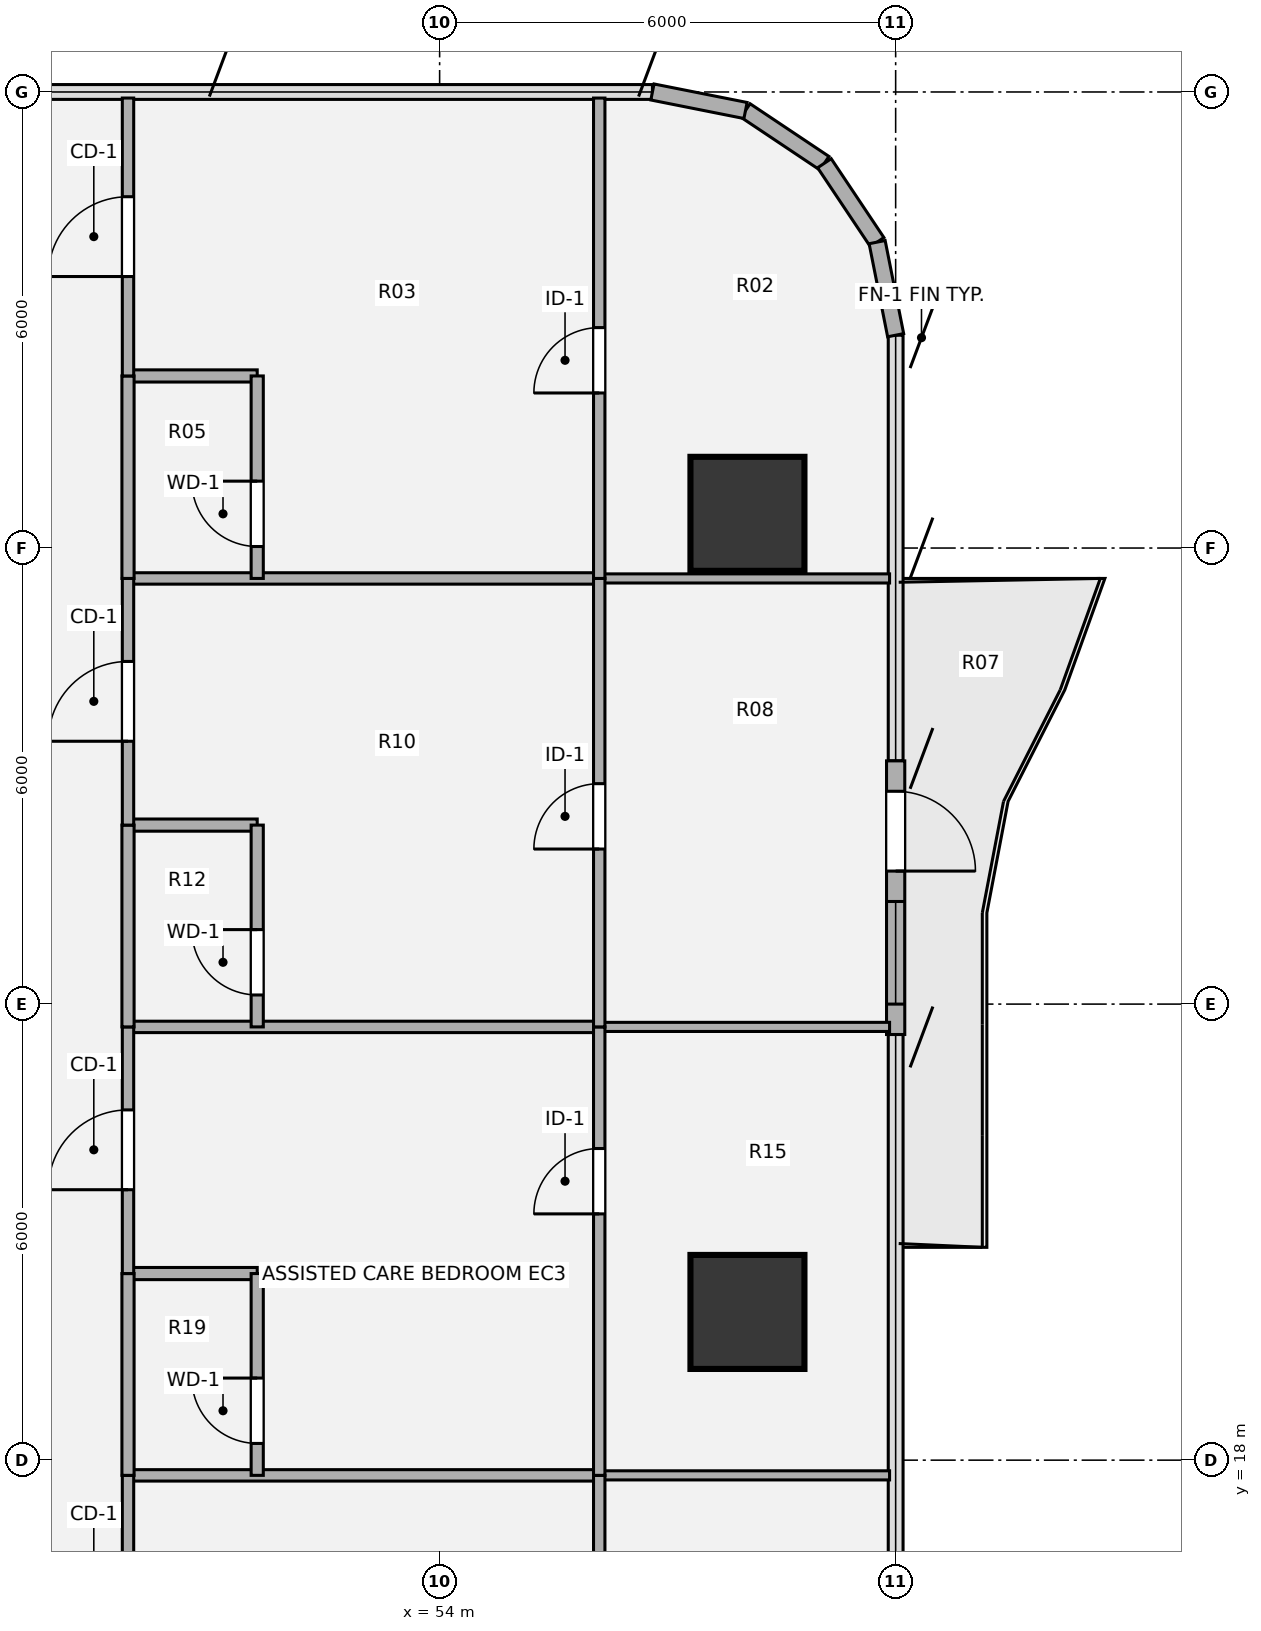
"""IFC4 building model, lengths in metres.
Left out: names, types, materials, properties, quantities, classifications, styles, units other than length and angle.
Written with IfcOpenShell. Run it as: python <this file> out.ifc"""

import sys

from ifc_helpers import new_model, si_unit, direction, frame, frame_2d, origin, origin_2d, place, context, subcontext, project, spatial, rectangle, hollow_circle, extrude, source, transform, mapped, element, fill, save


model = new_model("IFC4")
c1 = context("Model", 3, precision=1e-05, world=origin(), true_north=direction((0.0, 1.0)))
c2 = subcontext(c1, "Body", "Model", "MODEL_VIEW")
j1 = project(units=[si_unit("LENGTHUNIT", "METRE"), si_unit("PLANEANGLEUNIT", "RADIAN")], contexts=[c1])
p1 = place(None, origin())
s1 = spatial("IfcSite", under=j1, at=p1, CompositionType="ELEMENT")
p2 = place(p1, origin())
s2 = spatial("IfcBuilding", under=s1, at=p2, CompositionType="ELEMENT")
p3 = place(p2, frame((0.0, 0.0, 38.34)))
s3 = spatial("IfcBuildingStorey", under=s2, at=p3, CompositionType="ELEMENT", Elevation=38.34)
m1 = source(origin(), c2, "Body", "SweptSolid", [
    extrude(hollow_circle(Radius=0.75, WallThickness=0.05, at=origin_2d()), origin(), (0.0, 0.0, 1.0), 3.78),
])
for number, where, z_axis, x_axis in (
    (1, (58.05, 19.95, 0.0), (0.0, 0.0, 1.0), (1.0, 0.0, 0.0)),
    (2, (58.05, 30.45, 0.0), (0.0, 0.0, 1.0), (1.0, 0.0, 0.0)),
):
    element("IfcColumn", number, at=place(p3, frame(where, z_axis=z_axis, x_axis=x_axis)), inside=s3, PredefinedType="COLUMN", context=c2, shape_type="MappedRepresentation", body=[
        mapped(m1, transform((0.0, 0.0, 0.0), x_axis=(1.0, 0.0, 0.0), y_axis=(0.0, 1.0, 0.0), z_axis=(0.0, 0.0, 1.0), scale=1.0)),
    ])
for number, where, z_axis, x_axis in (
    (3, (58.025, 35.756, 0.0), (0.0, 0.0, 1.0), (0.831, -0.556, 0.0)),
    (4, (59.063, 35.063, 0.0), (0.0, 0.0, 1.0), (0.556, -0.831, 0.0)),
    (5, (59.756, 34.025, 0.0), (0.0, 0.0, 1.0), (0.195, -0.981, 0.0)),
):
    element("IfcWall", number, at=place(p3, frame(where, z_axis=z_axis, x_axis=x_axis)), inside=s3, PredefinedType="SOLIDWALL", context=c2, shape_type="SweptSolid", body=[
        extrude(rectangle(XDim=1.249, YDim=0.215, at=frame_2d((0.624, 0.0))), origin(), (0.0, 0.0, 1.0), 3.53),
    ])
p4 = place(p3, frame((60.0, 27.2, 0.0), z_axis=(0.0, 0.0, 1.0), x_axis=(0.0, -1.0, 0.0)))
e6 = element("IfcWall", 6, at=p4, inside=s3, PredefinedType="SOLIDWALL", context=c2, shape_type="SweptSolid", body=[
    extrude(rectangle(XDim=3.6, YDim=0.24, at=frame_2d((1.8, 0.0))), origin(), (0.0, 0.0, 1.0), 3.53),
])
p5 = place(p4, frame((0.4, 0.0, 0.0)))
e7 = element("IfcOpeningElement", 7, at=p5, cuts=e6, PredefinedType="OPENING", context=c2, shape_type="SweptSolid", body=[
    extrude(rectangle(XDim=1.05, YDim=2.15, at=origin_2d()), frame((0.525, 0.13, 1.075), z_axis=(0.0, -1.0, 0.0), x_axis=(1.0, 0.0, 0.0)), (0.0, 0.0, 1.0), 0.26),
])
p6 = place(p4, frame((1.85, 0.0, 0.85)))
e8 = element("IfcOpeningElement", 8, at=p6, cuts=e6, PredefinedType="OPENING", context=c2, shape_type="SweptSolid", body=[
    extrude(rectangle(XDim=1.35, YDim=1.35, at=origin_2d()), frame((0.675, 0.13, 0.675), z_axis=(0.0, -1.0, 0.0), x_axis=(1.0, 0.0, 0.0)), (0.0, 0.0, 1.0), 0.26),
])
p7 = place(p3, frame((56.8, 36.0, 0.0), z_axis=(0.0, 0.0, 1.0), x_axis=(0.980775717779, -0.195138390419, 0.0)))
e9 = element("IfcWall", 9, at=p7, inside=s3, PredefinedType="SOLIDWALL", context=c2, shape_type="SweptSolid", body=[
    extrude(rectangle(XDim=1.249, YDim=0.215, at=frame_2d((0.624, 0.0))), origin(), (0.0, 0.0, 1.0), 3.53),
])
p8 = place(p3, frame((49.9, 17.8, 0.0), z_axis=(0.0, 0.0, 1.0), x_axis=(1.0, 0.0, 0.0)))
e10 = element("IfcWall", 10, at=p8, inside=s3, PredefinedType="PARTITIONING", context=c2, shape_type="SweptSolid", body=[
    extrude(rectangle(XDim=6.2, YDim=0.15, at=frame_2d((3.1, 0.0))), origin(), (0.0, 0.0, 1.0), 3.5),
])
p9 = place(p3, frame((56.1, 17.8, 0.0), z_axis=(0.0, 0.0, 1.0), x_axis=(1.0, 0.0, 0.0)))
e11 = element("IfcWall", 11, at=p9, inside=s3, PredefinedType="PARTITIONING", context=c2, shape_type="SweptSolid", body=[
    extrude(rectangle(XDim=3.82, YDim=0.12, at=frame_2d((1.91, 0.0))), origin(), (0.0, 0.0, 1.0), 3.5),
])
p10 = place(p3, frame((49.9, 20.455, 0.0), z_axis=(0.0, 0.0, 1.0), x_axis=(1.0, 0.0, 0.0)))
e12 = element("IfcWall", 12, at=p10, inside=s3, PredefinedType="PLUMBINGWALL", context=c2, shape_type="SweptSolid", body=[
    extrude(rectangle(XDim=1.7, YDim=0.16, at=frame_2d((0.85, 0.0))), origin(), (0.0, 0.0, 1.0), 2.982),
])
p11 = place(p3, frame((49.9, 23.7, 0.0), z_axis=(0.0, 0.0, 1.0), x_axis=(1.0, 0.0, 0.0)))
e13 = element("IfcWall", 13, at=p11, inside=s3, PredefinedType="PARTITIONING", context=c2, shape_type="SweptSolid", body=[
    extrude(rectangle(XDim=6.2, YDim=0.15, at=frame_2d((3.1, 0.0))), origin(), (0.0, 0.0, 1.0), 2.982),
])
p12 = place(p3, frame((56.1, 23.7, 0.0), z_axis=(0.0, 0.0, 1.0), x_axis=(1.0, 0.0, 0.0)))
e14 = element("IfcWall", 14, at=p12, inside=s3, PredefinedType="PARTITIONING", context=c2, shape_type="SweptSolid", body=[
    extrude(rectangle(XDim=3.82, YDim=0.12, at=frame_2d((1.91, 0.0))), origin(), (0.0, 0.0, 1.0), 2.982),
])
p13 = place(p3, frame((49.9, 26.355, 0.0), z_axis=(0.0, 0.0, 1.0), x_axis=(1.0, 0.0, 0.0)))
e15 = element("IfcWall", 15, at=p13, inside=s3, PredefinedType="PLUMBINGWALL", context=c2, shape_type="SweptSolid", body=[
    extrude(rectangle(XDim=1.7, YDim=0.16, at=frame_2d((0.85, 0.0))), origin(), (0.0, 0.0, 1.0), 2.982),
])
p14 = place(p3, frame((49.9, 29.6, 0.0), z_axis=(0.0, 0.0, 1.0), x_axis=(1.0, 0.0, 0.0)))
e16 = element("IfcWall", 16, at=p14, inside=s3, PredefinedType="PARTITIONING", context=c2, shape_type="SweptSolid", body=[
    extrude(rectangle(XDim=6.2, YDim=0.15, at=frame_2d((3.1, 0.0))), origin(), (0.0, 0.0, 1.0), 2.982),
])
p15 = place(p3, frame((56.1, 29.6, 0.0), z_axis=(0.0, 0.0, 1.0), x_axis=(1.0, 0.0, 0.0)))
e17 = element("IfcWall", 17, at=p15, inside=s3, PredefinedType="PARTITIONING", context=c2, shape_type="SweptSolid", body=[
    extrude(rectangle(XDim=3.82, YDim=0.12, at=frame_2d((1.91, 0.0))), origin(), (0.0, 0.0, 1.0), 2.982),
])
p16 = place(p3, frame((49.9, 32.264, 0.0), z_axis=(0.0, 0.0, 1.0), x_axis=(1.0, 0.0, 0.0)))
e18 = element("IfcWall", 18, at=p16, inside=s3, PredefinedType="PLUMBINGWALL", context=c2, shape_type="SweptSolid", body=[
    extrude(rectangle(XDim=1.7, YDim=0.16, at=frame_2d((0.85, 0.0))), origin(), (0.0, 0.0, 1.0), 3.5),
])
p17 = place(p3, frame((49.9, 14.555, 0.0), z_axis=(0.0, 0.0, 1.0), x_axis=(0.0, 1.0, 0.0)))
e19 = element("IfcWall", 19, at=p17, inside=s3, PredefinedType="PARTITIONING", context=c2, shape_type="SweptSolid", body=[
    extrude(rectangle(XDim=3.245, YDim=0.15, at=frame_2d((1.623, 0.0))), origin(), (0.0, 0.0, 1.0), 3.5),
])
p18 = place(p17, frame((1.103, 0.0, 0.0)))
e20 = element("IfcOpeningElement", 20, at=p18, cuts=e19, PredefinedType="OPENING", context=c2, shape_type="SweptSolid", body=[
    extrude(rectangle(XDim=1.05, YDim=2.1, at=origin_2d()), frame((0.525, 0.085, 1.05), z_axis=(0.0, -1.0, 0.0), x_axis=(1.0, 0.0, 0.0)), (0.0, 0.0, 1.0), 0.17),
])
p19 = place(p3, frame((49.9, 17.8, 0.0), z_axis=(0.0, 0.0, 1.0), x_axis=(0.0, 1.0, 0.0)))
e21 = element("IfcWall", 21, at=p19, inside=s3, PredefinedType="PLUMBINGWALL", context=c2, shape_type="SweptSolid", body=[
    extrude(rectangle(XDim=2.655, YDim=0.16, at=frame_2d((1.328, 0.0))), origin(), (0.0, 0.0, 1.0), 3.5),
])
p20 = place(p3, frame((49.9, 20.455, 0.0), z_axis=(0.0, 0.0, 1.0), x_axis=(0.0, 1.0, 0.0)))
e22 = element("IfcWall", 22, at=p20, inside=s3, PredefinedType="PARTITIONING", context=c2, shape_type="SweptSolid", body=[
    extrude(rectangle(XDim=3.245, YDim=0.15, at=frame_2d((1.623, 0.0))), origin(), (0.0, 0.0, 1.0), 3.5),
])
p21 = place(p20, frame((1.103, 0.0, 0.0)))
e23 = element("IfcOpeningElement", 23, at=p21, cuts=e22, PredefinedType="OPENING", context=c2, shape_type="SweptSolid", body=[
    extrude(rectangle(XDim=1.05, YDim=2.1, at=origin_2d()), frame((0.525, 0.085, 1.05), z_axis=(0.0, -1.0, 0.0), x_axis=(1.0, 0.0, 0.0)), (0.0, 0.0, 1.0), 0.17),
])
p22 = place(p3, frame((49.9, 23.7, 0.0), z_axis=(0.0, 0.0, 1.0), x_axis=(0.0, 1.0, 0.0)))
e24 = element("IfcWall", 24, at=p22, inside=s3, PredefinedType="PLUMBINGWALL", context=c2, shape_type="SweptSolid", body=[
    extrude(rectangle(XDim=2.655, YDim=0.16, at=frame_2d((1.328, 0.0))), origin(), (0.0, 0.0, 1.0), 3.5),
])
p23 = place(p3, frame((49.9, 26.355, 0.0), z_axis=(0.0, 0.0, 1.0), x_axis=(0.0, 1.0, 0.0)))
e25 = element("IfcWall", 25, at=p23, inside=s3, PredefinedType="PARTITIONING", context=c2, shape_type="SweptSolid", body=[
    extrude(rectangle(XDim=3.245, YDim=0.15, at=frame_2d((1.623, 0.0))), origin(), (0.0, 0.0, 1.0), 3.5),
])
p24 = place(p23, frame((1.103, 0.0, 0.0)))
e26 = element("IfcOpeningElement", 26, at=p24, cuts=e25, PredefinedType="OPENING", context=c2, shape_type="SweptSolid", body=[
    extrude(rectangle(XDim=1.05, YDim=2.1, at=origin_2d()), frame((0.525, 0.085, 1.05), z_axis=(0.0, -1.0, 0.0), x_axis=(1.0, 0.0, 0.0)), (0.0, 0.0, 1.0), 0.17),
])
p25 = place(p3, frame((49.9, 29.6, 0.0), z_axis=(0.0, 0.0, 1.0), x_axis=(0.0, 1.0, 0.0)))
e27 = element("IfcWall", 27, at=p25, inside=s3, PredefinedType="PLUMBINGWALL", context=c2, shape_type="SweptSolid", body=[
    extrude(rectangle(XDim=2.664, YDim=0.16, at=frame_2d((1.332, 0.0))), origin(), (0.0, 0.0, 1.0), 3.5),
])
p26 = place(p3, frame((49.9, 32.264, 0.0), z_axis=(0.0, 0.0, 1.0), x_axis=(0.0, 1.0, 0.0)))
e28 = element("IfcWall", 28, at=p26, inside=s3, PredefinedType="PARTITIONING", context=c2, shape_type="SweptSolid", body=[
    extrude(rectangle(XDim=3.656, YDim=0.15, at=frame_2d((1.828, 0.0))), origin(), (0.0, 0.0, 1.0), 3.5),
])
p27 = place(p26, frame((1.308, 0.0, 0.0)))
e29 = element("IfcOpeningElement", 29, at=p27, cuts=e28, PredefinedType="OPENING", context=c2, shape_type="SweptSolid", body=[
    extrude(rectangle(XDim=1.05, YDim=2.1, at=origin_2d()), frame((0.525, 0.085, 1.05), z_axis=(0.0, -1.0, 0.0), x_axis=(1.0, 0.0, 0.0)), (0.0, 0.0, 1.0), 0.17),
])
p28 = place(p3, frame((51.6, 17.8, 0.0), z_axis=(0.0, 0.0, 1.0), x_axis=(0.0, 1.0, 0.0)))
e30 = element("IfcWall", 30, at=p28, inside=s3, PredefinedType="PLUMBINGWALL", context=c2, shape_type="SweptSolid", body=[
    extrude(rectangle(XDim=2.655, YDim=0.16, at=frame_2d((1.328, 0.0))), origin(), (0.0, 0.0, 1.0), 3.5),
])
p29 = place(p28, frame((0.42, 0.0, 0.0)))
e31 = element("IfcOpeningElement", 31, at=p29, cuts=e30, PredefinedType="OPENING", context=c2, shape_type="SweptSolid", body=[
    extrude(rectangle(XDim=0.86, YDim=2.1, at=origin_2d()), frame((0.43, 0.09, 1.05), z_axis=(0.0, -1.0, 0.0), x_axis=(1.0, 0.0, 0.0)), (0.0, 0.0, 1.0), 0.18),
])
p30 = place(p3, frame((51.6, 23.7, 0.0), z_axis=(0.0, 0.0, 1.0), x_axis=(0.0, 1.0, 0.0)))
e32 = element("IfcWall", 32, at=p30, inside=s3, PredefinedType="PLUMBINGWALL", context=c2, shape_type="SweptSolid", body=[
    extrude(rectangle(XDim=2.655, YDim=0.16, at=frame_2d((1.328, 0.0))), origin(), (0.0, 0.0, 1.0), 3.5),
])
p31 = place(p30, frame((0.42, 0.0, 0.0)))
e33 = element("IfcOpeningElement", 33, at=p31, cuts=e32, PredefinedType="OPENING", context=c2, shape_type="SweptSolid", body=[
    extrude(rectangle(XDim=0.86, YDim=2.1, at=origin_2d()), frame((0.43, 0.09, 1.05), z_axis=(0.0, -1.0, 0.0), x_axis=(1.0, 0.0, 0.0)), (0.0, 0.0, 1.0), 0.18),
])
p32 = place(p3, frame((51.6, 29.6, 0.0), z_axis=(0.0, 0.0, 1.0), x_axis=(0.0, 1.0, 0.0)))
e34 = element("IfcWall", 34, at=p32, inside=s3, PredefinedType="PLUMBINGWALL", context=c2, shape_type="SweptSolid", body=[
    extrude(rectangle(XDim=2.664, YDim=0.16, at=frame_2d((1.332, 0.0))), origin(), (0.0, 0.0, 1.0), 3.5),
])
p33 = place(p32, frame((0.42, 0.0, 0.0)))
e35 = element("IfcOpeningElement", 35, at=p33, cuts=e34, PredefinedType="OPENING", context=c2, shape_type="SweptSolid", body=[
    extrude(rectangle(XDim=0.86, YDim=2.1, at=origin_2d()), frame((0.43, 0.09, 1.05), z_axis=(0.0, -1.0, 0.0), x_axis=(1.0, 0.0, 0.0)), (0.0, 0.0, 1.0), 0.18),
])
p34 = place(p3, frame((56.1, 11.9, 0.0), z_axis=(0.0, 0.0, 1.0), x_axis=(0.0, 1.0, 0.0)))
e36 = element("IfcWall", 36, at=p34, inside=s3, PredefinedType="PARTITIONING", context=c2, shape_type="SweptSolid", body=[
    extrude(rectangle(XDim=5.9, YDim=0.15, at=frame_2d((2.95, 0.0))), origin(), (0.0, 0.0, 1.0), 3.5),
])
p35 = place(p34, frame((2.14, 0.0, 0.0)))
e37 = element("IfcOpeningElement", 37, at=p35, cuts=e36, PredefinedType="OPENING", context=c2, shape_type="SweptSolid", body=[
    extrude(rectangle(XDim=0.86, YDim=2.1, at=origin_2d()), frame((0.43, 0.085, 1.05), z_axis=(0.0, -1.0, 0.0), x_axis=(1.0, 0.0, 0.0)), (0.0, 0.0, 1.0), 0.17),
])
p36 = place(p3, frame((56.1, 17.8, 0.0), z_axis=(0.0, 0.0, 1.0), x_axis=(0.0, 1.0, 0.0)))
e38 = element("IfcWall", 38, at=p36, inside=s3, PredefinedType="PARTITIONING", context=c2, shape_type="SweptSolid", body=[
    extrude(rectangle(XDim=5.9, YDim=0.15, at=frame_2d((2.95, 0.0))), origin(), (0.0, 0.0, 1.0), 3.5),
])
p37 = place(p36, frame((3.44, 0.0, 0.0)))
e39 = element("IfcOpeningElement", 39, at=p37, cuts=e38, PredefinedType="OPENING", context=c2, shape_type="SweptSolid", body=[
    extrude(rectangle(XDim=0.86, YDim=2.1, at=origin_2d()), frame((0.43, 0.085, 1.05), z_axis=(0.0, -1.0, 0.0), x_axis=(1.0, 0.0, 0.0)), (0.0, 0.0, 1.0), 0.17),
])
p38 = place(p3, frame((56.1, 23.7, 0.0), z_axis=(0.0, 0.0, 1.0), x_axis=(0.0, 1.0, 0.0)))
e40 = element("IfcWall", 40, at=p38, inside=s3, PredefinedType="PARTITIONING", context=c2, shape_type="SweptSolid", body=[
    extrude(rectangle(XDim=5.9, YDim=0.15, at=frame_2d((2.95, 0.0))), origin(), (0.0, 0.0, 1.0), 3.5),
])
p39 = place(p38, frame((2.34, 0.0, 0.0)))
e41 = element("IfcOpeningElement", 41, at=p39, cuts=e40, PredefinedType="OPENING", context=c2, shape_type="SweptSolid", body=[
    extrude(rectangle(XDim=0.86, YDim=2.1, at=origin_2d()), frame((0.43, 0.085, 1.05), z_axis=(0.0, -1.0, 0.0), x_axis=(1.0, 0.0, 0.0)), (0.0, 0.0, 1.0), 0.17),
])
p40 = place(p3, frame((56.1, 29.6, 0.0), z_axis=(0.0, 0.0, 1.0), x_axis=(0.0, 1.0, 0.0)))
e42 = element("IfcWall", 42, at=p40, inside=s3, PredefinedType="PARTITIONING", context=c2, shape_type="SweptSolid", body=[
    extrude(rectangle(XDim=6.32, YDim=0.15, at=frame_2d((3.16, 0.0))), origin(), (0.0, 0.0, 1.0), 3.5),
])
p41 = place(p40, frame((2.44, 0.0, 0.0)))
e43 = element("IfcOpeningElement", 43, at=p41, cuts=e42, PredefinedType="OPENING", context=c2, shape_type="SweptSolid", body=[
    extrude(rectangle(XDim=0.86, YDim=2.1, at=origin_2d()), frame((0.43, 0.085, 1.05), z_axis=(0.0, -1.0, 0.0), x_axis=(1.0, 0.0, 0.0)), (0.0, 0.0, 1.0), 0.17),
])
m2 = source(origin(), c2, "Body", "SweptSolid", [
    extrude(rectangle(XDim=1.05, YDim=2.15, at=origin_2d()), frame((0.525, 0.025, 1.075), z_axis=(0.0, -1.0, 0.0), x_axis=(1.0, 0.0, 0.0)), (0.0, 0.0, 1.0), 0.05),
])
p42 = place(p5, origin())
e44 = element("IfcDoor", 44, at=p42, inside=s3, OperationType="SINGLE_SWING_RIGHT", PredefinedType="DOOR", context=c2, shape_type="MappedRepresentation", body=[
    mapped(m2, transform((0.0, 0.0, 0.0), x_axis=(1.0, 0.0, 0.0), y_axis=(0.0, 1.0, 0.0), z_axis=(0.0, 0.0, 1.0), scale=1.0)),
])
fill(e7, e44)
m3 = source(origin(), c2, "Body", "SweptSolid", [
    extrude(rectangle(XDim=1.35, YDim=1.35, at=origin_2d()), frame((0.675, 0.03, 0.675), z_axis=(0.0, -1.0, 0.0), x_axis=(1.0, 0.0, 0.0)), (0.0, 0.0, 1.0), 0.06),
])
p43 = place(p6, origin())
e45 = element("IfcWindow", 45, at=p43, inside=s3, PartitioningType="SINGLE_PANEL", PredefinedType="WINDOW", context=c2, shape_type="MappedRepresentation", body=[
    mapped(m3, transform((0.0, 0.0, 0.0), x_axis=(1.0, 0.0, 0.0), y_axis=(0.0, 1.0, 0.0), z_axis=(0.0, 0.0, 1.0), scale=1.0)),
])
fill(e8, e45)
m4 = source(origin(), c2, "Body", "SweptSolid", [
    extrude(rectangle(XDim=1.05, YDim=2.1, at=origin_2d()), frame((0.525, 0.025, 1.05), z_axis=(0.0, -1.0, 0.0), x_axis=(1.0, 0.0, 0.0)), (0.0, 0.0, 1.0), 0.05),
])
p44 = place(p21, origin())
e46 = element("IfcDoor", 46, at=p44, inside=s3, OperationType="SINGLE_SWING_LEFT", PredefinedType="DOOR", context=c2, shape_type="MappedRepresentation", body=[
    mapped(m4, transform((0.0, 0.0, 0.0), x_axis=(1.0, 0.0, 0.0), y_axis=(0.0, 1.0, 0.0), z_axis=(0.0, 0.0, 1.0), scale=1.0)),
])
fill(e23, e46)
p45 = place(p24, origin())
e47 = element("IfcDoor", 47, at=p45, inside=s3, OperationType="SINGLE_SWING_LEFT", PredefinedType="DOOR", context=c2, shape_type="MappedRepresentation", body=[
    mapped(m4, transform((0.0, 0.0, 0.0), x_axis=(1.0, 0.0, 0.0), y_axis=(0.0, 1.0, 0.0), z_axis=(0.0, 0.0, 1.0), scale=1.0)),
])
fill(e26, e47)
p46 = place(p27, origin())
e48 = element("IfcDoor", 48, at=p46, inside=s3, OperationType="SINGLE_SWING_LEFT", PredefinedType="DOOR", context=c2, shape_type="MappedRepresentation", body=[
    mapped(m4, transform((0.0, 0.0, 0.0), x_axis=(1.0, 0.0, 0.0), y_axis=(0.0, 1.0, 0.0), z_axis=(0.0, 0.0, 1.0), scale=1.0)),
])
fill(e29, e48)
m5 = source(origin(), c2, "Body", "SweptSolid", [
    extrude(rectangle(XDim=0.86, YDim=2.1, at=origin_2d()), frame((0.43, 0.025, 1.05), z_axis=(0.0, -1.0, 0.0), x_axis=(1.0, 0.0, 0.0)), (0.0, 0.0, 1.0), 0.05),
])
p47 = place(p29, origin())
e49 = element("IfcDoor", 49, at=p47, inside=s3, OperationType="SINGLE_SWING_RIGHT", PredefinedType="DOOR", context=c2, shape_type="MappedRepresentation", body=[
    mapped(m5, transform((0.0, 0.0, 0.0), x_axis=(1.0, 0.0, 0.0), y_axis=(0.0, 1.0, 0.0), z_axis=(0.0, 0.0, 1.0), scale=1.0)),
])
fill(e31, e49)
p48 = place(p31, origin())
e50 = element("IfcDoor", 50, at=p48, inside=s3, OperationType="SINGLE_SWING_RIGHT", PredefinedType="DOOR", context=c2, shape_type="MappedRepresentation", body=[
    mapped(m5, transform((0.0, 0.0, 0.0), x_axis=(1.0, 0.0, 0.0), y_axis=(0.0, 1.0, 0.0), z_axis=(0.0, 0.0, 1.0), scale=1.0)),
])
fill(e33, e50)
p49 = place(p33, origin())
e51 = element("IfcDoor", 51, at=p49, inside=s3, OperationType="SINGLE_SWING_RIGHT", PredefinedType="DOOR", context=c2, shape_type="MappedRepresentation", body=[
    mapped(m5, transform((0.0, 0.0, 0.0), x_axis=(1.0, 0.0, 0.0), y_axis=(0.0, 1.0, 0.0), z_axis=(0.0, 0.0, 1.0), scale=1.0)),
])
fill(e35, e51)
m6 = source(origin(), c2, "Body", "SweptSolid", [
    extrude(rectangle(XDim=0.86, YDim=2.1, at=origin_2d()), frame((0.43, 0.025, 1.05), z_axis=(0.0, -1.0, 0.0), x_axis=(1.0, 0.0, 0.0)), (0.0, 0.0, 1.0), 0.05),
])
p50 = place(p37, origin())
e52 = element("IfcDoor", 52, at=p50, inside=s3, OperationType="SINGLE_SWING_LEFT", PredefinedType="DOOR", context=c2, shape_type="MappedRepresentation", body=[
    mapped(m6, transform((0.0, 0.0, 0.0), x_axis=(1.0, 0.0, 0.0), y_axis=(0.0, 1.0, 0.0), z_axis=(0.0, 0.0, 1.0), scale=1.0)),
])
fill(e39, e52)
p51 = place(p39, origin())
e53 = element("IfcDoor", 53, at=p51, inside=s3, OperationType="SINGLE_SWING_LEFT", PredefinedType="DOOR", context=c2, shape_type="MappedRepresentation", body=[
    mapped(m6, transform((0.0, 0.0, 0.0), x_axis=(1.0, 0.0, 0.0), y_axis=(0.0, 1.0, 0.0), z_axis=(0.0, 0.0, 1.0), scale=1.0)),
])
fill(e41, e53)
p52 = place(p41, origin())
e54 = element("IfcDoor", 54, at=p52, inside=s3, OperationType="SINGLE_SWING_LEFT", PredefinedType="DOOR", context=c2, shape_type="MappedRepresentation", body=[
    mapped(m6, transform((0.0, 0.0, 0.0), x_axis=(1.0, 0.0, 0.0), y_axis=(0.0, 1.0, 0.0), z_axis=(0.0, 0.0, 1.0), scale=1.0)),
])
fill(e43, e54)
save(model, sys.argv[1])
